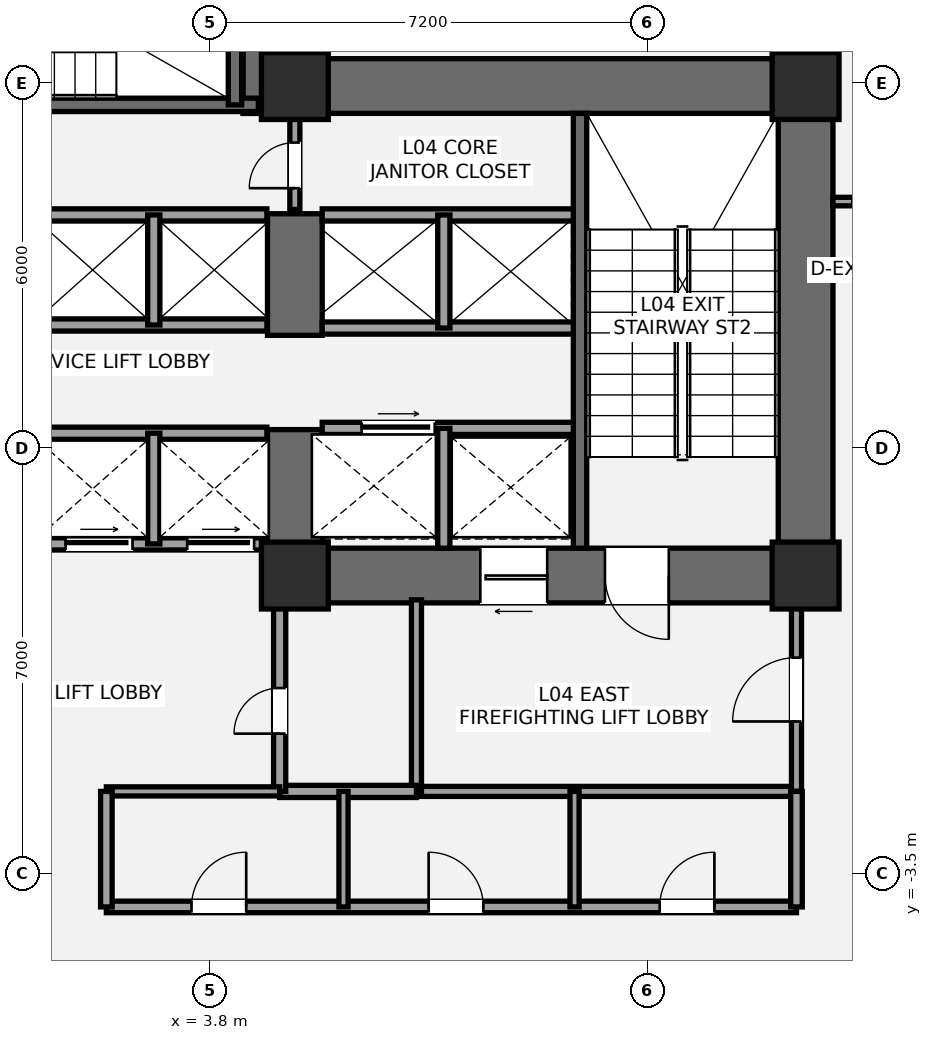
"""IFC4 building model, lengths in metres.
Left out: names, types, materials, properties, quantities, classifications, styles, units other than length and angle.
Written with IfcOpenShell. Run it as: python <this file> out.ifc"""

import sys

from ifc_helpers import new_model, si_unit, direction, frame, frame_2d, origin, origin_2d, place, context, subcontext, project, spatial, rectangle, extrude, element, fill, save


model = new_model("IFC4")
c1 = context("Model", 3, precision=1e-05, world=origin(), true_north=direction((0.0, 1.0)))
c2 = subcontext(c1, "Body", "Model", "MODEL_VIEW")
j1 = project(units=[si_unit("LENGTHUNIT", "METRE"), si_unit("PLANEANGLEUNIT", "RADIAN")], contexts=[c1])
p1 = place(None, origin())
s1 = spatial("IfcSite", under=j1, at=p1, CompositionType="ELEMENT")
p2 = place(p1, origin())
s2 = spatial("IfcBuilding", under=s1, at=p2, CompositionType="ELEMENT")
p3 = place(p2, frame((0.0, 0.0, 18.6)))
s3 = spatial("IfcBuildingStorey", under=s2, at=p3, CompositionType="ELEMENT", Elevation=18.6)
p4 = place(p3, frame((13.6, 0.95, 0.0), z_axis=(0.0, 0.0, 1.0), x_axis=(0.0, 1.0, 0.0)))
e1 = element("IfcWall", 1, at=p4, inside=s3, PredefinedType="SHEAR", context=c2, shape_type="SweptSolid", body=[
    extrude(rectangle(XDim=8.95, YDim=0.9, at=frame_2d((4.475, 0.0))), origin(), (0.0, 0.0, 1.0), 4.2),
])
p5 = place(p3, frame((4.35, 9.45, 0.0), z_axis=(0.0, 0.0, 1.0), x_axis=(1.0, 0.0, 0.0)))
e2 = element("IfcWall", 2, at=p5, inside=s3, PredefinedType="SHEAR", context=c2, shape_type="SweptSolid", body=[
    extrude(rectangle(XDim=9.7, YDim=0.9, at=frame_2d((4.85, 0.0))), origin(), (0.0, 0.0, 1.0), 4.2),
])
p6 = place(p3, frame((14.05, 1.4, 0.0), z_axis=(0.0, 0.0, 1.0), x_axis=(-1.0, 0.0, 0.0)))
e3 = element("IfcWall", 3, at=p6, inside=s3, PredefinedType="SHEAR", context=c2, shape_type="SweptSolid", body=[
    extrude(rectangle(XDim=9.3, YDim=0.9, at=frame_2d((4.65, 0.0))), origin(), (0.0, 0.0, 1.0), 4.2),
])
p7 = place(p6, frame((2.7, 0.0, 0.0)))
e4 = element("IfcOpeningElement", 4, at=p7, cuts=e3, PredefinedType="OPENING", context=c2, shape_type="SweptSolid", body=[
    extrude(rectangle(XDim=1.05, YDim=2.15, at=frame_2d((0.525, 1.075))), frame((0.0, 0.46, 0.0), z_axis=(0.0, -1.0, 0.0), x_axis=(1.0, 0.0, 0.0)), (0.0, 0.0, 1.0), 0.92),
])
p8 = place(p6, frame((4.7, 0.0, 0.0)))
e5 = element("IfcOpeningElement", 5, at=p8, cuts=e3, PredefinedType="OPENING", context=c2, shape_type="SweptSolid", body=[
    extrude(rectangle(XDim=1.1, YDim=2.2, at=frame_2d((0.55, 1.1))), frame((0.0, 0.46, 0.0), z_axis=(0.0, -1.0, 0.0), x_axis=(1.0, 0.0, 0.0)), (0.0, 0.0, 1.0), 0.92),
])
p9 = place(p3, frame((5.2, 0.95, 0.0), z_axis=(0.0, 0.0, 1.0), x_axis=(0.0, 1.0, 0.0)))
e6 = element("IfcWall", 6, at=p9, inside=s3, PredefinedType="SHEAR", context=c2, shape_type="SweptSolid", body=[
    extrude(rectangle(XDim=2.85, YDim=0.9, at=frame_2d((1.425, 0.0))), origin(), (0.0, 0.0, 1.0), 4.2),
])
p10 = place(p3, frame((5.2, 5.35, 0.0), z_axis=(0.0, 0.0, 1.0), x_axis=(0.0, 1.0, 0.0)))
e7 = element("IfcWall", 7, at=p10, inside=s3, PredefinedType="SHEAR", context=c2, shape_type="SweptSolid", body=[
    extrude(rectangle(XDim=2.0, YDim=0.9, at=frame_2d((1.0, 0.0))), origin(), (0.0, 0.0, 1.0), 4.2),
])
p11 = place(p3, frame((9.89, 1.85, 0.0), z_axis=(0.0, 0.0, 1.0), x_axis=(0.0, 1.0, 0.0)))
e8 = element("IfcWall", 8, at=p11, inside=s3, PredefinedType="SHEAR", context=c2, shape_type="SweptSolid", body=[
    extrude(rectangle(XDim=7.15, YDim=0.22, at=frame_2d((3.575, 0.0))), origin(), (0.0, 0.0, 1.0), 4.2),
])
p12 = place(p3, frame((4.8, 9.0, 0.0), z_axis=(0.0, 0.0, 1.0), x_axis=(0.0, 1.0, 0.0)))
e9 = element("IfcWall", 9, at=p12, inside=s3, PredefinedType="SHEAR", context=c2, shape_type="SweptSolid", body=[
    extrude(rectangle(XDim=4.3, YDim=0.9, at=frame_2d((2.15, 0.0))), origin(), (0.0, 0.0, 1.0), 4.2),
])
p13 = place(p3, frame((-4.7, 9.14, 0.0), z_axis=(0.0, 0.0, 1.0), x_axis=(1.0, 0.0, 0.0)))
e10 = element("IfcWall", 10, at=p13, inside=s3, PredefinedType="SHEAR", context=c2, shape_type="SweptSolid", body=[
    extrude(rectangle(XDim=9.3, YDim=0.22, at=frame_2d((4.65, 0.0))), origin(), (0.0, 0.0, 1.0), 4.2),
])
p14 = place(p13, frame((1.15, 0.0, 0.0)))
e11 = element("IfcOpeningElement", 11, at=p14, cuts=e10, PredefinedType="OPENING", context=c2, shape_type="SweptSolid", body=[
    extrude(rectangle(XDim=1.05, YDim=2.15, at=frame_2d((0.525, 1.075))), frame((0.0, 0.12, 0.0), z_axis=(0.0, -1.0, 0.0), x_axis=(1.0, 0.0, 0.0)), (0.0, 0.0, 1.0), 0.24),
])
p15 = place(p3, frame((4.215, 9.14, 0.0), z_axis=(0.0, 0.0, 1.0), x_axis=(0.0, 1.0, 0.0)))
e12 = element("IfcWall", 12, at=p15, inside=s3, PredefinedType="SHEAR", context=c2, shape_type="SweptSolid", body=[
    extrude(rectangle(XDim=3.26, YDim=0.22, at=frame_2d((1.63, 0.0))), origin(), (0.0, 0.0, 1.0), 4.2),
])
for number, where, z_axis, x_axis in (
    (13, (5.2, 1.4, 0.0), (0.0, 0.0, 1.0), (1.0, 0.0, 0.0)),
    (14, (5.2, 9.45, 0.0), (0.0, 0.0, 1.0), (1.0, 0.0, 0.0)),
    (15, (13.6, 1.4, 0.0), (0.0, 0.0, 1.0), (1.0, 0.0, 0.0)),
    (16, (13.6, 9.45, 0.0), (0.0, 0.0, 1.0), (1.0, 0.0, 0.0)),
):
    element("IfcColumn", number, at=place(p3, frame(where, z_axis=z_axis, x_axis=x_axis)), inside=s3, PredefinedType="COLUMN", context=c2, shape_type="SweptSolid", body=[
        extrude(rectangle(XDim=1.1, YDim=1.1, at=origin_2d()), origin(), (0.0, 0.0, 1.0), 4.2),
    ])
p16 = place(p3, frame((7.2, -2.15, 0.0), z_axis=(0.0, 0.0, 1.0), x_axis=(1.0, 0.0, 0.0)))
e17 = element("IfcWall", 17, at=p16, inside=s3, PredefinedType="PARTITIONING", context=c2, shape_type="SweptSolid", body=[
    extrude(rectangle(XDim=6.25, YDim=0.165, at=frame_2d((3.125, 0.0))), origin(), (0.0, 0.0, 1.0), 3.98),
])
p17 = place(p3, frame((7.2, -2.15, 0.0), z_axis=(0.0, 0.0, 1.0), x_axis=(0.0, 1.0, 0.0)))
e18 = element("IfcWall", 18, at=p17, inside=s3, PredefinedType="PARTITIONING", context=c2, shape_type="SweptSolid", body=[
    extrude(rectangle(XDim=3.15, YDim=0.165, at=frame_2d((1.575, 0.0))), origin(), (0.0, 0.0, 1.0), 3.98),
])
p18 = place(p3, frame((13.45, -2.15, 0.0), z_axis=(0.0, 0.0, 1.0), x_axis=(0.0, 1.0, 0.0)))
e19 = element("IfcWall", 19, at=p18, inside=s3, PredefinedType="PARTITIONING", context=c2, shape_type="SweptSolid", body=[
    extrude(rectangle(XDim=3.15, YDim=0.165, at=frame_2d((1.575, 0.0))), origin(), (0.0, 0.0, 1.0), 3.433),
])
p19 = place(p18, frame((1.15, 0.0, 0.0)))
e20 = element("IfcOpeningElement", 20, at=p19, cuts=e19, PredefinedType="OPENING", context=c2, shape_type="SweptSolid", body=[
    extrude(rectangle(XDim=1.05, YDim=2.15, at=frame_2d((0.525, 1.075))), frame((0.0, 0.093, 0.0), z_axis=(0.0, -1.0, 0.0), x_axis=(1.0, 0.0, 0.0)), (0.0, 0.0, 1.0), 0.185),
])
p20 = place(p3, frame((4.95, -2.15, 0.0), z_axis=(0.0, 0.0, 1.0), x_axis=(1.0, 0.0, 0.0)))
e21 = element("IfcWall", 21, at=p20, inside=s3, PredefinedType="SOLIDWALL", context=c2, shape_type="SweptSolid", body=[
    extrude(rectangle(XDim=2.25, YDim=0.2, at=frame_2d((1.125, 0.0))), origin(), (0.0, 0.0, 1.0), 3.98),
])
p21 = place(p3, frame((4.95, -2.15, 0.0), z_axis=(0.0, 0.0, 1.0), x_axis=(0.0, 1.0, 0.0)))
e22 = element("IfcWall", 22, at=p21, inside=s3, PredefinedType="SOLIDWALL", context=c2, shape_type="SweptSolid", body=[
    extrude(rectangle(XDim=3.15, YDim=0.2, at=frame_2d((1.575, 0.0))), origin(), (0.0, 0.0, 1.0), 3.348),
])
p22 = place(p21, frame((0.95, 0.0, 0.0)))
e23 = element("IfcOpeningElement", 23, at=p22, cuts=e22, PredefinedType="OPENING", context=c2, shape_type="SweptSolid", body=[
    extrude(rectangle(XDim=0.75, YDim=2.1, at=frame_2d((0.375, 1.05))), frame((0.0, 0.11, 0.0), z_axis=(0.0, -1.0, 0.0), x_axis=(1.0, 0.0, 0.0)), (0.0, 0.0, 1.0), 0.22),
])
p23 = place(p3, frame((5.65, 3.82, 0.0), z_axis=(0.0, 0.0, 1.0), x_axis=(1.0, 0.0, 0.0)))
e24 = element("IfcWall", 24, at=p23, inside=s3, PredefinedType="SOLIDWALL", context=c2, shape_type="SweptSolid", body=[
    extrude(rectangle(XDim=4.13, YDim=0.2, at=frame_2d((2.065, 0.0))), origin(), (0.0, 0.0, 1.0), 3.98),
])
p24 = place(p23, frame((0.65, 0.0, 0.0)))
e25 = element("IfcOpeningElement", 25, at=p24, cuts=e24, PredefinedType="OPENING", context=c2, shape_type="SweptSolid", body=[
    extrude(rectangle(XDim=1.2, YDim=2.2, at=frame_2d((0.6, 1.1))), frame((0.0, 0.11, 0.0), z_axis=(0.0, -1.0, 0.0), x_axis=(1.0, 0.0, 0.0)), (0.0, 0.0, 1.0), 0.22),
])
p25 = place(p3, frame((7.65, 1.85, 0.0), z_axis=(0.0, 0.0, 1.0), x_axis=(0.0, 1.0, 0.0)))
e26 = element("IfcWall", 26, at=p25, inside=s3, PredefinedType="SOLIDWALL", context=c2, shape_type="SweptSolid", body=[
    extrude(rectangle(XDim=1.97, YDim=0.2, at=frame_2d((0.985, 0.0))), origin(), (0.0, 0.0, 1.0), 3.98),
])
for number, where, z_axis, x_axis in (
    (27, (5.65, 5.47, 0.0), (0.0, 0.0, 1.0), (1.0, 0.0, 0.0)),
    (28, (5.65, 7.33, 0.0), (0.0, 0.0, 1.0), (1.0, 0.0, 0.0)),
):
    element("IfcWall", number, at=place(p3, frame(where, z_axis=z_axis, x_axis=x_axis)), inside=s3, PredefinedType="SOLIDWALL", context=c2, shape_type="SweptSolid", body=[
        extrude(rectangle(XDim=4.13, YDim=0.2, at=frame_2d((2.065, 0.0))), origin(), (0.0, 0.0, 1.0), 3.98),
    ])
p26 = place(p3, frame((7.65, 5.47, 0.0), z_axis=(0.0, 0.0, 1.0), x_axis=(0.0, 1.0, 0.0)))
e29 = element("IfcWall", 29, at=p26, inside=s3, PredefinedType="SOLIDWALL", context=c2, shape_type="SweptSolid", body=[
    extrude(rectangle(XDim=1.86, YDim=0.2, at=frame_2d((0.93, 0.0))), origin(), (0.0, 0.0, 1.0), 3.98),
])
p27 = place(p3, frame((0.88, 1.92, 0.0), z_axis=(0.0, 0.0, 1.0), x_axis=(1.0, 0.0, 0.0)))
e30 = element("IfcWall", 30, at=p27, inside=s3, PredefinedType="SOLIDWALL", context=c2, shape_type="SweptSolid", body=[
    extrude(rectangle(XDim=3.86, YDim=0.2, at=frame_2d((1.93, 0.0))), origin(), (0.0, 0.0, 1.0), 2.97),
])
p28 = place(p27, frame((0.55, 0.0, 0.0)))
e31 = element("IfcOpeningElement", 31, at=p28, cuts=e30, PredefinedType="OPENING", context=c2, shape_type="SweptSolid", body=[
    extrude(rectangle(XDim=1.1, YDim=2.2, at=frame_2d((0.55, 1.1))), frame((0.0, 0.11, 0.0), z_axis=(0.0, -1.0, 0.0), x_axis=(1.0, 0.0, 0.0)), (0.0, 0.0, 1.0), 0.22),
])
p29 = place(p27, frame((2.55, 0.0, 0.0)))
e32 = element("IfcOpeningElement", 32, at=p29, cuts=e30, PredefinedType="OPENING", context=c2, shape_type="SweptSolid", body=[
    extrude(rectangle(XDim=1.1, YDim=2.2, at=frame_2d((0.55, 1.1))), frame((0.0, 0.11, 0.0), z_axis=(0.0, -1.0, 0.0), x_axis=(1.0, 0.0, 0.0)), (0.0, 0.0, 1.0), 0.22),
])
p30 = place(p3, frame((0.88, 3.74, 0.0), z_axis=(0.0, 0.0, 1.0), x_axis=(1.0, 0.0, 0.0)))
e33 = element("IfcWall", 33, at=p30, inside=s3, PredefinedType="SOLIDWALL", context=c2, shape_type="SweptSolid", body=[
    extrude(rectangle(XDim=3.86, YDim=0.2, at=frame_2d((1.93, 0.0))), origin(), (0.0, 0.0, 1.0), 3.98),
])
p31 = place(p3, frame((2.88, 1.92, 0.0), z_axis=(0.0, 0.0, 1.0), x_axis=(0.0, 1.0, 0.0)))
e34 = element("IfcWall", 34, at=p31, inside=s3, PredefinedType="SOLIDWALL", context=c2, shape_type="SweptSolid", body=[
    extrude(rectangle(XDim=1.82, YDim=0.2, at=frame_2d((0.91, 0.0))), origin(), (0.0, 0.0, 1.0), 3.98),
])
for number, where, z_axis, x_axis in (
    (35, (0.88, 5.52, 0.0), (0.0, 0.0, 1.0), (1.0, 0.0, 0.0)),
    (36, (0.88, 7.33, 0.0), (0.0, 0.0, 1.0), (1.0, 0.0, 0.0)),
):
    element("IfcWall", number, at=place(p3, frame(where, z_axis=z_axis, x_axis=x_axis)), inside=s3, PredefinedType="SOLIDWALL", context=c2, shape_type="SweptSolid", body=[
        extrude(rectangle(XDim=3.86, YDim=0.2, at=frame_2d((1.93, 0.0))), origin(), (0.0, 0.0, 1.0), 3.98),
    ])
p32 = place(p3, frame((2.88, 5.52, 0.0), z_axis=(0.0, 0.0, 1.0), x_axis=(0.0, 1.0, 0.0)))
e37 = element("IfcWall", 37, at=p32, inside=s3, PredefinedType="SOLIDWALL", context=c2, shape_type="SweptSolid", body=[
    extrude(rectangle(XDim=1.81, YDim=0.2, at=frame_2d((0.905, 0.0))), origin(), (0.0, 0.0, 1.0), 3.98),
])
p33 = place(p3, frame((5.2, 7.42, 0.0), z_axis=(0.0, 0.0, 1.0), x_axis=(0.0, 1.0, 0.0)))
e38 = element("IfcWall", 38, at=p33, inside=s3, PredefinedType="PARTITIONING", context=c2, shape_type="SweptSolid", body=[
    extrude(rectangle(XDim=1.58, YDim=0.165, at=frame_2d((0.79, 0.0))), origin(), (0.0, 0.0, 1.0), 3.98),
])
p34 = place(p33, frame((0.35, 0.0, 0.0)))
e39 = element("IfcOpeningElement", 39, at=p34, cuts=e38, PredefinedType="OPENING", context=c2, shape_type="SweptSolid", body=[
    extrude(rectangle(XDim=0.75, YDim=2.1, at=frame_2d((0.375, 1.05))), frame((0.0, 0.093, 0.0), z_axis=(0.0, -1.0, 0.0), x_axis=(1.0, 0.0, 0.0)), (0.0, 0.0, 1.0), 0.185),
])
p35 = place(p3, frame((2.1, -4.05, 0.0), z_axis=(0.0, 0.0, 1.0), x_axis=(1.0, 0.0, 0.0)))
e40 = element("IfcWall", 40, at=p35, inside=s3, PredefinedType="PLUMBINGWALL", context=c2, shape_type="SweptSolid", body=[
    extrude(rectangle(XDim=11.35, YDim=0.19, at=frame_2d((5.675, 0.0))), origin(), (0.0, 0.0, 1.0), 3.507),
])
p36 = place(p35, frame((1.4, 0.0, 0.0)))
e41 = element("IfcOpeningElement", 41, at=p36, cuts=e40, PredefinedType="OPENING", context=c2, shape_type="SweptSolid", body=[
    extrude(rectangle(XDim=0.9, YDim=2.1, at=frame_2d((0.45, 1.05))), frame((0.0, 0.105, 0.0), z_axis=(0.0, -1.0, 0.0), x_axis=(1.0, 0.0, 0.0)), (0.0, 0.0, 1.0), 0.21),
])
p37 = place(p35, frame((5.3, 0.0, 0.0)))
e42 = element("IfcOpeningElement", 42, at=p37, cuts=e40, PredefinedType="OPENING", context=c2, shape_type="SweptSolid", body=[
    extrude(rectangle(XDim=0.9, YDim=2.1, at=frame_2d((0.45, 1.05))), frame((0.0, 0.105, 0.0), z_axis=(0.0, -1.0, 0.0), x_axis=(1.0, 0.0, 0.0)), (0.0, 0.0, 1.0), 0.21),
])
p38 = place(p35, frame((9.1, 0.0, 0.0)))
e43 = element("IfcOpeningElement", 43, at=p38, cuts=e40, PredefinedType="OPENING", context=c2, shape_type="SweptSolid", body=[
    extrude(rectangle(XDim=0.9, YDim=2.1, at=frame_2d((0.45, 1.05))), frame((0.0, 0.105, 0.0), z_axis=(0.0, -1.0, 0.0), x_axis=(1.0, 0.0, 0.0)), (0.0, 0.0, 1.0), 0.21),
])
p39 = place(p3, frame((2.1, -2.15, 0.0), z_axis=(0.0, 0.0, 1.0), x_axis=(1.0, 0.0, 0.0)))
e44 = element("IfcWall", 44, at=p39, inside=s3, PredefinedType="PLUMBINGWALL", context=c2, shape_type="SweptSolid", body=[
    extrude(rectangle(XDim=2.85, YDim=0.15, at=frame_2d((1.425, 0.0))), origin(), (0.0, 0.0, 1.0), 3.98),
])
for number, where, z_axis, x_axis in (
    (45, (2.1, -4.05, 0.0), (0.0, 0.0, 1.0), (0.0, 1.0, 0.0)),
    (46, (13.45, -4.05, 0.0), (0.0, 0.0, 1.0), (0.0, 1.0, 0.0)),
):
    element("IfcWall", number, at=place(p3, frame(where, z_axis=z_axis, x_axis=x_axis)), inside=s3, PredefinedType="PLUMBINGWALL", context=c2, shape_type="SweptSolid", body=[
        extrude(rectangle(XDim=1.9, YDim=0.19, at=frame_2d((0.95, 0.0))), origin(), (0.0, 0.0, 1.0), 3.98),
    ])
p40 = place(p3, frame((6.0, -4.05, 0.0), z_axis=(0.0, 0.0, 1.0), x_axis=(0.0, 1.0, 0.0)))
e47 = element("IfcWall", 47, at=p40, inside=s3, PredefinedType="PLUMBINGWALL", context=c2, shape_type="SweptSolid", body=[
    extrude(rectangle(XDim=1.9, YDim=0.15, at=frame_2d((0.95, 0.0))), origin(), (0.0, 0.0, 1.0), 3.348),
])
p41 = place(p3, frame((9.8, -4.05, 0.0), z_axis=(0.0, 0.0, 1.0), x_axis=(0.0, 1.0, 0.0)))
e48 = element("IfcWall", 48, at=p41, inside=s3, PredefinedType="PLUMBINGWALL", context=c2, shape_type="SweptSolid", body=[
    extrude(rectangle(XDim=1.9, YDim=0.15, at=frame_2d((0.95, 0.0))), origin(), (0.0, 0.0, 1.0), 3.98),
])
p42 = place(p3, frame((14.05, 7.55, 0.0), z_axis=(0.0, 0.0, 1.0), x_axis=(1.0, 0.0, 0.0)))
e49 = element("IfcWall", 49, at=p42, inside=s3, PredefinedType="PARTITIONING", context=c2, shape_type="SweptSolid", body=[
    extrude(rectangle(XDim=1.95, YDim=0.14, at=frame_2d((0.975, 0.0))), origin(), (0.0, 0.0, 1.0), 3.433),
])
p43 = place(p42, frame((0.32, 0.0, 0.0)))
e50 = element("IfcOpeningElement", 50, at=p43, cuts=e49, PredefinedType="OPENING", context=c2, shape_type="SweptSolid", body=[
    extrude(rectangle(XDim=0.92, YDim=2.15, at=frame_2d((0.46, 1.075))), frame((0.0, 0.08, 0.0), z_axis=(0.0, -1.0, 0.0), x_axis=(1.0, 0.0, 0.0)), (0.0, 0.0, 1.0), 0.16),
])
p44 = place(p7, origin())
e51 = element("IfcDoor", 51, at=p44, inside=s3, OperationType="SINGLE_SWING_LEFT", PredefinedType="DOOR", context=c2, shape_type="SweptSolid", body=[
    extrude(rectangle(XDim=1.05, YDim=2.15, at=frame_2d((0.525, 1.075))), frame((0.0, 0.025, 0.0), z_axis=(0.0, -1.0, 0.0), x_axis=(1.0, 0.0, 0.0)), (0.0, 0.0, 1.0), 0.05),
])
fill(e4, e51)
p45 = place(p19, origin())
e52 = element("IfcDoor", 52, at=p45, inside=s3, OperationType="SINGLE_SWING_LEFT", PredefinedType="DOOR", context=c2, shape_type="SweptSolid", body=[
    extrude(rectangle(XDim=1.05, YDim=2.15, at=frame_2d((0.525, 1.075))), frame((0.0, 0.025, 0.0), z_axis=(0.0, -1.0, 0.0), x_axis=(1.0, 0.0, 0.0)), (0.0, 0.0, 1.0), 0.05),
])
fill(e20, e52)
p46 = place(p22, origin())
e53 = element("IfcDoor", 53, at=p46, inside=s3, OperationType="SINGLE_SWING_LEFT", PredefinedType="DOOR", context=c2, shape_type="SweptSolid", body=[
    extrude(rectangle(XDim=0.75, YDim=2.1, at=frame_2d((0.375, 1.05))), frame((0.0, 0.025, 0.0), z_axis=(0.0, -1.0, 0.0), x_axis=(1.0, 0.0, 0.0)), (0.0, 0.0, 1.0), 0.05),
])
fill(e23, e53)
p47 = place(p8, origin())
e54 = element("IfcDoor", 54, at=p47, inside=s3, OperationType="SLIDING_TO_LEFT", PredefinedType="DOOR", context=c2, shape_type="SweptSolid", body=[
    extrude(rectangle(XDim=1.1, YDim=2.2, at=frame_2d((0.55, 1.1))), frame((0.0, 0.025, 0.0), z_axis=(0.0, -1.0, 0.0), x_axis=(1.0, 0.0, 0.0)), (0.0, 0.0, 1.0), 0.05),
])
fill(e5, e54)
p48 = place(p24, origin())
e55 = element("IfcDoor", 55, at=p48, inside=s3, OperationType="SLIDING_TO_RIGHT", PredefinedType="DOOR", context=c2, shape_type="SweptSolid", body=[
    extrude(rectangle(XDim=1.2, YDim=2.2, at=frame_2d((0.6, 1.1))), frame((0.0, 0.025, 0.0), z_axis=(0.0, -1.0, 0.0), x_axis=(1.0, 0.0, 0.0)), (0.0, 0.0, 1.0), 0.05),
])
fill(e25, e55)
p49 = place(p28, origin())
e56 = element("IfcDoor", 56, at=p49, inside=s3, OperationType="SLIDING_TO_LEFT", PredefinedType="DOOR", context=c2, shape_type="SweptSolid", body=[
    extrude(rectangle(XDim=1.1, YDim=2.2, at=frame_2d((0.55, 1.1))), frame((0.0, 0.025, 0.0), z_axis=(0.0, -1.0, 0.0), x_axis=(1.0, 0.0, 0.0)), (0.0, 0.0, 1.0), 0.05),
])
fill(e31, e56)
p50 = place(p29, origin())
e57 = element("IfcDoor", 57, at=p50, inside=s3, OperationType="SLIDING_TO_LEFT", PredefinedType="DOOR", context=c2, shape_type="SweptSolid", body=[
    extrude(rectangle(XDim=1.1, YDim=2.2, at=frame_2d((0.55, 1.1))), frame((0.0, 0.025, 0.0), z_axis=(0.0, -1.0, 0.0), x_axis=(1.0, 0.0, 0.0)), (0.0, 0.0, 1.0), 0.05),
])
fill(e32, e57)
p51 = place(p34, origin())
e58 = element("IfcDoor", 58, at=p51, inside=s3, OperationType="SINGLE_SWING_LEFT", PredefinedType="DOOR", context=c2, shape_type="SweptSolid", body=[
    extrude(rectangle(XDim=0.75, YDim=2.1, at=frame_2d((0.375, 1.05))), frame((0.0, 0.025, 0.0), z_axis=(0.0, -1.0, 0.0), x_axis=(1.0, 0.0, 0.0)), (0.0, 0.0, 1.0), 0.05),
])
fill(e39, e58)
p52 = place(p36, origin())
e59 = element("IfcDoor", 59, at=p52, inside=s3, OperationType="SINGLE_SWING_RIGHT", PredefinedType="DOOR", context=c2, shape_type="SweptSolid", body=[
    extrude(rectangle(XDim=0.9, YDim=2.1, at=frame_2d((0.45, 1.05))), frame((0.0, 0.025, 0.0), z_axis=(0.0, -1.0, 0.0), x_axis=(1.0, 0.0, 0.0)), (0.0, 0.0, 1.0), 0.05),
])
fill(e41, e59)
p53 = place(p37, origin())
e60 = element("IfcDoor", 60, at=p53, inside=s3, OperationType="SINGLE_SWING_LEFT", PredefinedType="DOOR", context=c2, shape_type="SweptSolid", body=[
    extrude(rectangle(XDim=0.9, YDim=2.1, at=frame_2d((0.45, 1.05))), frame((0.0, 0.025, 0.0), z_axis=(0.0, -1.0, 0.0), x_axis=(1.0, 0.0, 0.0)), (0.0, 0.0, 1.0), 0.05),
])
fill(e42, e60)
p54 = place(p38, origin())
e61 = element("IfcDoor", 61, at=p54, inside=s3, OperationType="SINGLE_SWING_RIGHT", PredefinedType="DOOR", context=c2, shape_type="SweptSolid", body=[
    extrude(rectangle(XDim=0.9, YDim=2.1, at=frame_2d((0.45, 1.05))), frame((0.0, 0.025, 0.0), z_axis=(0.0, -1.0, 0.0), x_axis=(1.0, 0.0, 0.0)), (0.0, 0.0, 1.0), 0.05),
])
fill(e43, e61)
save(model, sys.argv[1])
